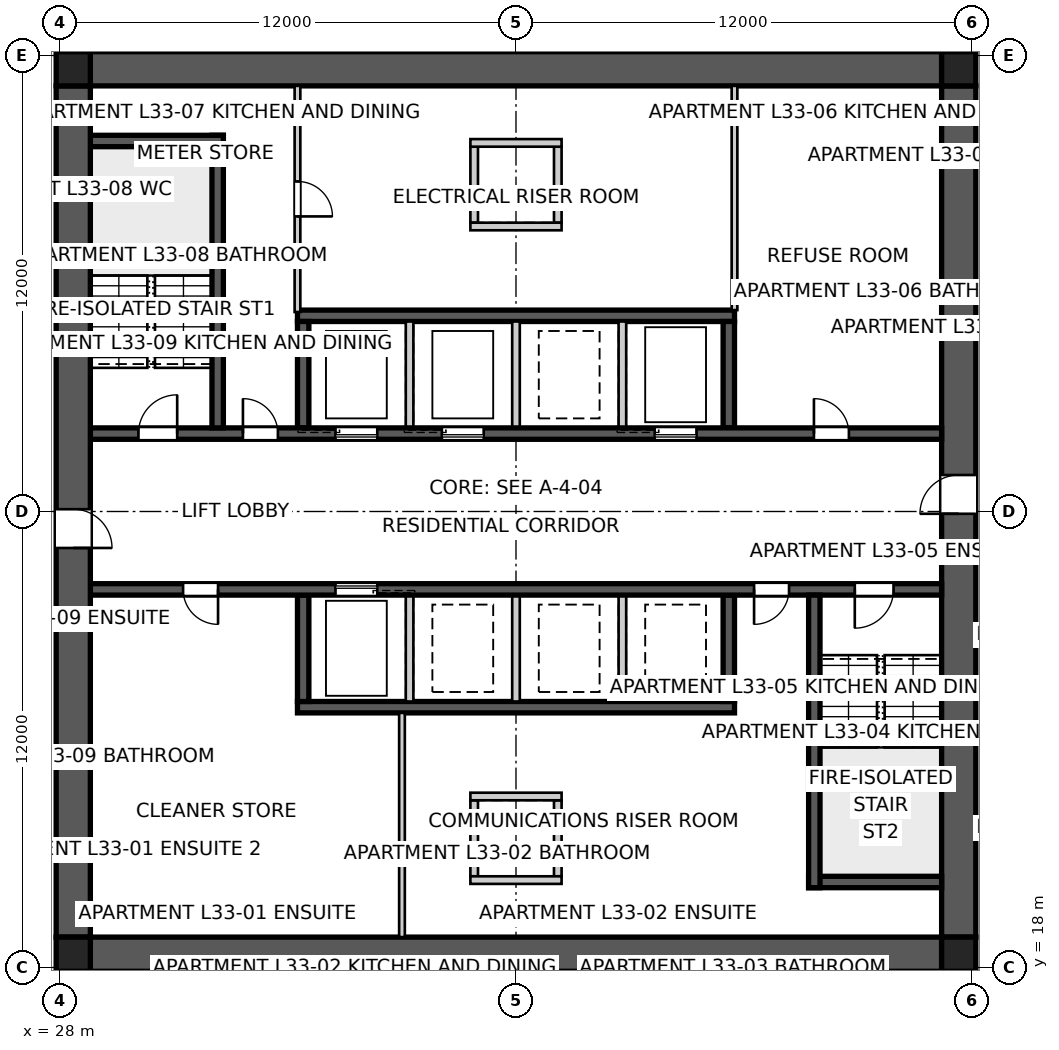
"""IFC4 building model, lengths in metres.
Left out: names, types, materials, properties, quantities, classifications, styles, units other than length and angle.
Written with IfcOpenShell. Run it as: python <this file> out.ifc"""

import sys

from ifc_helpers import new_model, si_unit, direction, frame, frame_2d, origin, origin_2d, place, context, subcontext, project, spatial, polyline, rectangle, outline, extrude, element, fill, save


model = new_model("IFC4")
c1 = context("Model", 3, precision=1e-05, world=origin(), true_north=direction((0.0, 1.0)))
c2 = subcontext(c1, "Body", "Model", "MODEL_VIEW")
j1 = project(units=[si_unit("LENGTHUNIT", "METRE"), si_unit("PLANEANGLEUNIT", "RADIAN")], contexts=[c1])
p1 = place(None, origin())
s1 = spatial("IfcSite", under=j1, at=p1, CompositionType="ELEMENT")
p2 = place(p1, origin())
s2 = spatial("IfcBuilding", under=s1, at=p2, CompositionType="ELEMENT")
p3 = place(p2, frame((0.0, 0.0, 121.8)))
s3 = spatial("IfcBuildingStorey", under=s2, at=p3, CompositionType="ELEMENT", Elevation=121.8)
for number, where, z_axis, x_axis in (
    (1, (28.8, 41.65, 0.0), (0.0, 0.0, 1.0), (1.0, 0.0, 0.0)),
    (2, (51.2, 18.35, 0.0), (0.0, 0.0, 1.0), (-1.0, 0.0, 0.0)),
):
    element("IfcWall", number, at=place(p3, frame(where, z_axis=z_axis, x_axis=x_axis)), inside=s3, PredefinedType="SHEAR", context=c2, shape_type="SweptSolid", body=[
        extrude(outline(polyline([(0.0, -0.45), (22.4, -0.45), (22.4, -0.025), (22.85, -0.025), (22.85, 0.025), (22.4, 0.025), (22.4, 0.45), (0.0, 0.45), (0.0, 0.025), (-0.45, 0.025), (-0.45, -0.025), (0.0, -0.025), (0.0, -0.45)])), origin(), (0.0, 0.0, 1.0), 3.4),
    ])
p4 = place(p3, frame((51.65, 18.8, 0.0), z_axis=(0.0, 0.0, 1.0), x_axis=(0.0, 1.0, 0.0)))
e3 = element("IfcWall", 3, at=p4, inside=s3, PredefinedType="SHEAR", context=c2, shape_type="SweptSolid", body=[
    extrude(outline(polyline([(0.0, -0.45), (22.4, -0.45), (22.4, -0.025), (22.85, -0.025), (22.85, 0.025), (22.4, 0.025), (22.4, 0.45), (0.0, 0.45), (0.0, 0.025), (-0.45, 0.025), (-0.45, -0.025), (0.0, -0.025), (0.0, -0.45)])), origin(), (0.0, 0.0, 1.0), 3.4),
])
p5 = place(p4, frame((11.14, 0.0, 0.0)))
e4 = element("IfcOpeningElement", 4, at=p5, cuts=e3, PredefinedType="OPENING", context=c2, shape_type="SweptSolid", body=[
    extrude(rectangle(XDim=1.02, YDim=2.4, at=frame_2d((0.51, 1.2))), frame((0.0, 0.46, 0.0), z_axis=(0.0, -1.0, 0.0), x_axis=(1.0, 0.0, 0.0)), (0.0, 0.0, 1.0), 0.92),
])
p6 = place(p3, frame((28.35, 41.2, 0.0), z_axis=(0.0, 0.0, 1.0), x_axis=(0.0, -1.0, 0.0)))
e5 = element("IfcWall", 5, at=p6, inside=s3, PredefinedType="SHEAR", context=c2, shape_type="SweptSolid", body=[
    extrude(outline(polyline([(0.0, -0.45), (22.4, -0.45), (22.4, -0.025), (22.85, -0.025), (22.85, 0.025), (22.4, 0.025), (22.4, 0.45), (0.0, 0.45), (0.0, 0.025), (-0.45, 0.025), (-0.45, -0.025), (0.0, -0.025), (0.0, -0.45)])), origin(), (0.0, 0.0, 1.0), 3.4),
])
p7 = place(p6, frame((11.14, 0.0, 0.0)))
e6 = element("IfcOpeningElement", 6, at=p7, cuts=e5, PredefinedType="OPENING", context=c2, shape_type="SweptSolid", body=[
    extrude(rectangle(XDim=1.02, YDim=2.4, at=frame_2d((0.51, 1.2))), frame((0.0, 0.46, 0.0), z_axis=(0.0, -1.0, 0.0), x_axis=(1.0, 0.0, 0.0)), (0.0, 0.0, 1.0), 0.92),
])
p8 = place(p3, frame((28.8, 32.05, 0.0), z_axis=(0.0, 0.0, 1.0), x_axis=(1.0, 0.0, 0.0)))
e7 = element("IfcWall", 7, at=p8, inside=s3, PredefinedType="SHEAR", context=c2, shape_type="SweptSolid", body=[
    extrude(rectangle(XDim=22.4, YDim=0.3, at=frame_2d((11.2, 0.0))), origin(), (0.0, 0.0, 1.0), 3.4),
])
p9 = place(p8, frame((19.04, 0.0, 0.0)))
e8 = element("IfcOpeningElement", 8, at=p9, cuts=e7, PredefinedType="OPENING", context=c2, shape_type="SweptSolid", body=[
    extrude(rectangle(XDim=0.92, YDim=2.1, at=frame_2d((0.46, 1.05))), frame((0.0, 0.16, 0.0), z_axis=(0.0, -1.0, 0.0), x_axis=(1.0, 0.0, 0.0)), (0.0, 0.0, 1.0), 0.32),
])
p10 = place(p8, frame((1.265, 0.0, 0.0)))
e9 = element("IfcOpeningElement", 9, at=p10, cuts=e7, PredefinedType="OPENING", context=c2, shape_type="SweptSolid", body=[
    extrude(rectangle(XDim=1.02, YDim=2.1, at=frame_2d((0.51, 1.05))), frame((0.0, 0.16, 0.0), z_axis=(0.0, -1.0, 0.0), x_axis=(1.0, 0.0, 0.0)), (0.0, 0.0, 1.0), 0.32),
])
p11 = place(p8, frame((4.015, 0.0, 0.0)))
e10 = element("IfcOpeningElement", 10, at=p11, cuts=e7, PredefinedType="OPENING", context=c2, shape_type="SweptSolid", body=[
    extrude(rectangle(XDim=0.92, YDim=2.1, at=frame_2d((0.46, 1.05))), frame((0.0, 0.16, 0.0), z_axis=(0.0, -1.0, 0.0), x_axis=(1.0, 0.0, 0.0)), (0.0, 0.0, 1.0), 0.32),
])
p12 = place(p8, frame((6.45, 0.0, 0.0)))
e11 = element("IfcOpeningElement", 11, at=p12, cuts=e7, PredefinedType="OPENING", context=c2, shape_type="SweptSolid", body=[
    extrude(rectangle(XDim=1.1, YDim=2.1, at=frame_2d((0.55, 1.05))), frame((0.0, 0.16, 0.0), z_axis=(0.0, -1.0, 0.0), x_axis=(1.0, 0.0, 0.0)), (0.0, 0.0, 1.0), 0.32),
])
p13 = place(p8, frame((9.25, 0.0, 0.0)))
e12 = element("IfcOpeningElement", 12, at=p13, cuts=e7, PredefinedType="OPENING", context=c2, shape_type="SweptSolid", body=[
    extrude(rectangle(XDim=1.1, YDim=2.1, at=frame_2d((0.55, 1.05))), frame((0.0, 0.16, 0.0), z_axis=(0.0, -1.0, 0.0), x_axis=(1.0, 0.0, 0.0)), (0.0, 0.0, 1.0), 0.32),
])
p14 = place(p8, frame((14.85, 0.0, 0.0)))
e13 = element("IfcOpeningElement", 13, at=p14, cuts=e7, PredefinedType="OPENING", context=c2, shape_type="SweptSolid", body=[
    extrude(rectangle(XDim=1.1, YDim=2.1, at=frame_2d((0.55, 1.05))), frame((0.0, 0.16, 0.0), z_axis=(0.0, -1.0, 0.0), x_axis=(1.0, 0.0, 0.0)), (0.0, 0.0, 1.0), 0.32),
])
p15 = place(p3, frame((51.2, 27.95, 0.0), z_axis=(0.0, 0.0, 1.0), x_axis=(-1.0, 0.0, 0.0)))
e14 = element("IfcWall", 14, at=p15, inside=s3, PredefinedType="SHEAR", context=c2, shape_type="SweptSolid", body=[
    extrude(rectangle(XDim=22.4, YDim=0.3, at=frame_2d((11.2, 0.0))), origin(), (0.0, 0.0, 1.0), 3.4),
])
p16 = place(p15, frame((19.04, 0.0, 0.0)))
e15 = element("IfcOpeningElement", 15, at=p16, cuts=e14, PredefinedType="OPENING", context=c2, shape_type="SweptSolid", body=[
    extrude(rectangle(XDim=0.92, YDim=2.1, at=frame_2d((0.46, 1.05))), frame((0.0, 0.16, 0.0), z_axis=(0.0, -1.0, 0.0), x_axis=(1.0, 0.0, 0.0)), (0.0, 0.0, 1.0), 0.32),
])
p17 = place(p15, frame((1.265, 0.0, 0.0)))
e16 = element("IfcOpeningElement", 16, at=p17, cuts=e14, PredefinedType="OPENING", context=c2, shape_type="SweptSolid", body=[
    extrude(rectangle(XDim=1.02, YDim=2.1, at=frame_2d((0.51, 1.05))), frame((0.0, 0.16, 0.0), z_axis=(0.0, -1.0, 0.0), x_axis=(1.0, 0.0, 0.0)), (0.0, 0.0, 1.0), 0.32),
])
p18 = place(p15, frame((4.015, 0.0, 0.0)))
e17 = element("IfcOpeningElement", 17, at=p18, cuts=e14, PredefinedType="OPENING", context=c2, shape_type="SweptSolid", body=[
    extrude(rectangle(XDim=0.92, YDim=2.1, at=frame_2d((0.46, 1.05))), frame((0.0, 0.16, 0.0), z_axis=(0.0, -1.0, 0.0), x_axis=(1.0, 0.0, 0.0)), (0.0, 0.0, 1.0), 0.32),
])
p19 = place(p15, frame((14.85, 0.0, 0.0)))
e18 = element("IfcOpeningElement", 18, at=p19, cuts=e14, PredefinedType="OPENING", context=c2, shape_type="SweptSolid", body=[
    extrude(rectangle(XDim=1.1, YDim=2.1, at=frame_2d((0.55, 1.05))), frame((0.0, 0.16, 0.0), z_axis=(0.0, -1.0, 0.0), x_axis=(1.0, 0.0, 0.0)), (0.0, 0.0, 1.0), 0.32),
])
for number, where, z_axis, x_axis in (
    (19, (34.25, 35.15, 0.0), (0.0, 0.0, 1.0), (1.0, 0.0, 0.0)),
    (20, (45.75, 24.85, 0.0), (0.0, 0.0, 1.0), (-1.0, 0.0, 0.0)),
):
    element("IfcWall", number, at=place(p3, frame(where, z_axis=z_axis, x_axis=x_axis)), inside=s3, PredefinedType="SHEAR", context=c2, shape_type="SweptSolid", body=[
        extrude(rectangle(XDim=11.5, YDim=0.3, at=frame_2d((5.75, 0.0))), origin(), (0.0, 0.0, 1.0), 3.4),
    ])
for number, where, z_axis, x_axis in (
    (21, (34.4, 32.2, 0.0), (0.0, 0.0, 1.0), (0.0, 1.0, 0.0)),
    (22, (45.6, 27.8, 0.0), (0.0, 0.0, 1.0), (0.0, -1.0, 0.0)),
):
    element("IfcWall", number, at=place(p3, frame(where, z_axis=z_axis, x_axis=x_axis)), inside=s3, PredefinedType="SHEAR", context=c2, shape_type="SweptSolid", body=[
        extrude(rectangle(XDim=2.8, YDim=0.3, at=frame_2d((1.4, 0.0))), origin(), (0.0, 0.0, 1.0), 3.4),
    ])
for number, where, z_axis, x_axis in (
    (23, (37.2, 32.2, 0.0), (0.0, 0.0, 1.0), (0.0, 1.0, 0.0)),
    (24, (42.8, 27.8, 0.0), (0.0, 0.0, 1.0), (0.0, -1.0, 0.0)),
    (25, (40.0, 32.2, 0.0), (0.0, 0.0, 1.0), (0.0, 1.0, 0.0)),
    (26, (40.0, 27.8, 0.0), (0.0, 0.0, 1.0), (0.0, -1.0, 0.0)),
    (27, (42.8, 32.2, 0.0), (0.0, 0.0, 1.0), (0.0, 1.0, 0.0)),
    (28, (37.2, 27.8, 0.0), (0.0, 0.0, 1.0), (0.0, -1.0, 0.0)),
):
    element("IfcWall", number, at=place(p3, frame(where, z_axis=z_axis, x_axis=x_axis)), inside=s3, PredefinedType="SOLIDWALL", context=c2, shape_type="SweptSolid", body=[
        extrude(rectangle(XDim=2.8, YDim=0.2, at=frame_2d((1.4, 0.0))), origin(), (0.0, 0.0, 1.0), 3.4),
    ])
for number, where, z_axis, x_axis in (
    (29, (45.6, 32.2, 0.0), (0.0, 0.0, 1.0), (0.0, 1.0, 0.0)),
    (30, (34.4, 27.8, 0.0), (0.0, 0.0, 1.0), (0.0, -1.0, 0.0)),
):
    element("IfcWall", number, at=place(p3, frame(where, z_axis=z_axis, x_axis=x_axis)), inside=s3, PredefinedType="SHEAR", context=c2, shape_type="SweptSolid", body=[
        extrude(rectangle(XDim=2.8, YDim=0.3, at=frame_2d((1.4, 0.0))), origin(), (0.0, 0.0, 1.0), 3.4),
    ])
p20 = place(p3, frame((32.15, 32.2, 0.0), z_axis=(0.0, 0.0, 1.0), x_axis=(0.0, 1.0, 0.0)))
e31 = element("IfcWall", 31, at=p20, inside=s3, PredefinedType="SHEAR", context=c2, shape_type="SweptSolid", body=[
    extrude(rectangle(XDim=7.7, YDim=0.3, at=frame_2d((3.85, 0.0))), origin(), (0.0, 0.0, 1.0), 3.4),
])
p21 = place(p3, frame((28.8, 39.75, 0.0), z_axis=(0.0, 0.0, 1.0), x_axis=(1.0, 0.0, 0.0)))
e32 = element("IfcWall", 32, at=p21, inside=s3, PredefinedType="SHEAR", context=c2, shape_type="SweptSolid", body=[
    extrude(rectangle(XDim=3.5, YDim=0.3, at=frame_2d((1.75, 0.0))), origin(), (0.0, 0.0, 1.0), 3.4),
])
p22 = place(p3, frame((47.85, 27.8, 0.0), z_axis=(0.0, 0.0, 1.0), x_axis=(0.0, -1.0, 0.0)))
e33 = element("IfcWall", 33, at=p22, inside=s3, PredefinedType="SHEAR", context=c2, shape_type="SweptSolid", body=[
    extrude(rectangle(XDim=7.7, YDim=0.3, at=frame_2d((3.85, 0.0))), origin(), (0.0, 0.0, 1.0), 3.4),
])
p23 = place(p3, frame((51.2, 20.25, 0.0), z_axis=(0.0, 0.0, 1.0), x_axis=(-1.0, 0.0, 0.0)))
e34 = element("IfcWall", 34, at=p23, inside=s3, PredefinedType="SHEAR", context=c2, shape_type="SweptSolid", body=[
    extrude(rectangle(XDim=3.5, YDim=0.3, at=frame_2d((1.75, 0.0))), origin(), (0.0, 0.0, 1.0), 3.4),
])
for number, where, z_axis, x_axis in (
    (35, (38.9, 37.6, 0.0), (0.0, 0.0, 1.0), (0.0, 1.0, 0.0)),
    (36, (41.1, 37.6, 0.0), (0.0, 0.0, 1.0), (0.0, 1.0, 0.0)),
):
    element("IfcWall", number, at=place(p3, frame(where, z_axis=z_axis, x_axis=x_axis)), inside=s3, PredefinedType="SOLIDWALL", context=c2, shape_type="SweptSolid", body=[
        extrude(rectangle(XDim=2.0, YDim=0.2, at=frame_2d((1.0, 0.0))), origin(), (0.0, 0.0, 1.0), 3.4),
    ])
for number, where, z_axis, x_axis in (
    (37, (38.8, 37.5, 0.0), (0.0, 0.0, 1.0), (1.0, 0.0, 0.0)),
    (38, (38.8, 39.7, 0.0), (0.0, 0.0, 1.0), (1.0, 0.0, 0.0)),
):
    element("IfcWall", number, at=place(p3, frame(where, z_axis=z_axis, x_axis=x_axis)), inside=s3, PredefinedType="SOLIDWALL", context=c2, shape_type="SweptSolid", body=[
        extrude(rectangle(XDim=2.4, YDim=0.2, at=frame_2d((1.2, 0.0))), origin(), (0.0, 0.0, 1.0), 3.4),
    ])
for number, where, z_axis, x_axis in (
    (39, (38.9, 22.4, 0.0), (0.0, 0.0, 1.0), (0.0, -1.0, 0.0)),
    (40, (41.1, 22.4, 0.0), (0.0, 0.0, 1.0), (0.0, -1.0, 0.0)),
):
    element("IfcWall", number, at=place(p3, frame(where, z_axis=z_axis, x_axis=x_axis)), inside=s3, PredefinedType="SOLIDWALL", context=c2, shape_type="SweptSolid", body=[
        extrude(rectangle(XDim=2.0, YDim=0.2, at=frame_2d((1.0, 0.0))), origin(), (0.0, 0.0, 1.0), 3.4),
    ])
for number, where, z_axis, x_axis in (
    (41, (38.8, 22.5, 0.0), (0.0, 0.0, 1.0), (1.0, 0.0, 0.0)),
    (42, (38.8, 20.3, 0.0), (0.0, 0.0, 1.0), (1.0, 0.0, 0.0)),
):
    element("IfcWall", number, at=place(p3, frame(where, z_axis=z_axis, x_axis=x_axis)), inside=s3, PredefinedType="SOLIDWALL", context=c2, shape_type="SweptSolid", body=[
        extrude(rectangle(XDim=2.4, YDim=0.2, at=frame_2d((1.2, 0.0))), origin(), (0.0, 0.0, 1.0), 3.4),
    ])
for number, where, z_axis, x_axis in (
    (43, (28.35, 18.35, 0.0), (0.0, 0.0, 1.0), (1.0, 0.0, 0.0)),
    (44, (51.65, 18.35, 0.0), (0.0, 0.0, 1.0), (1.0, 0.0, 0.0)),
    (45, (51.65, 41.65, 0.0), (0.0, 0.0, 1.0), (1.0, 0.0, 0.0)),
    (46, (28.35, 41.65, 0.0), (0.0, 0.0, 1.0), (1.0, 0.0, 0.0)),
):
    element("IfcColumn", number, at=place(p3, frame(where, z_axis=z_axis, x_axis=x_axis)), inside=s3, PredefinedType="COLUMN", context=c2, shape_type="SweptSolid", body=[
        extrude(rectangle(XDim=0.9, YDim=0.9, at=origin_2d()), origin(), (0.0, 0.0, 1.0), 3.4),
    ])
p24 = place(p3, frame((34.25, 41.2, 0.0), z_axis=(0.0, 0.0, 1.0), x_axis=(0.0, -1.0, 0.0)))
e47 = element("IfcWall", 47, at=p24, inside=s3, PredefinedType="SOLIDWALL", context=c2, shape_type="SweptSolid", body=[
    extrude(rectangle(XDim=5.95, YDim=0.15, at=frame_2d((2.975, 0.0))), origin(), (0.0, 0.0, 1.0), 3.25),
])
p25 = place(p24, frame((2.515, 0.0, 0.0)))
e48 = element("IfcOpeningElement", 48, at=p25, cuts=e47, PredefinedType="OPENING", context=c2, shape_type="SweptSolid", body=[
    extrude(rectangle(XDim=0.92, YDim=2.1, at=frame_2d((0.46, 1.05))), frame((0.0, 0.085, 0.0), z_axis=(0.0, -1.0, 0.0), x_axis=(1.0, 0.0, 0.0)), (0.0, 0.0, 1.0), 0.17),
])
for number, where, z_axis, x_axis in (
    (49, (45.75, 41.2, 0.0), (0.0, 0.0, 1.0), (0.0, -1.0, 0.0)),
    (50, (37.0, 18.8, 0.0), (0.0, 0.0, 1.0), (0.0, 1.0, 0.0)),
):
    element("IfcWall", number, at=place(p3, frame(where, z_axis=z_axis, x_axis=x_axis)), inside=s3, PredefinedType="SOLIDWALL", context=c2, shape_type="SweptSolid", body=[
        extrude(rectangle(XDim=5.9, YDim=0.15, at=frame_2d((2.95, 0.0))), origin(), (0.0, 0.0, 1.0), 3.25),
    ])
p26 = place(p9, origin())
e51 = element("IfcDoor", 51, at=p26, inside=s3, OperationType="SINGLE_SWING_LEFT", PredefinedType="DOOR", context=c2, shape_type="SweptSolid", body=[
    extrude(rectangle(XDim=0.92, YDim=2.1, at=frame_2d((0.46, 1.05))), frame((0.0, 0.025, 0.0), z_axis=(0.0, -1.0, 0.0), x_axis=(1.0, 0.0, 0.0)), (0.0, 0.0, 1.0), 0.05),
])
fill(e8, e51)
p27 = place(p16, origin())
e52 = element("IfcDoor", 52, at=p27, inside=s3, OperationType="SINGLE_SWING_LEFT", PredefinedType="DOOR", context=c2, shape_type="SweptSolid", body=[
    extrude(rectangle(XDim=0.92, YDim=2.1, at=frame_2d((0.46, 1.05))), frame((0.0, 0.025, 0.0), z_axis=(0.0, -1.0, 0.0), x_axis=(1.0, 0.0, 0.0)), (0.0, 0.0, 1.0), 0.05),
])
fill(e15, e52)
p28 = place(p17, origin())
e53 = element("IfcDoor", 53, at=p28, inside=s3, OperationType="SINGLE_SWING_RIGHT", PredefinedType="DOOR", context=c2, shape_type="SweptSolid", body=[
    extrude(rectangle(XDim=1.02, YDim=2.1, at=frame_2d((0.51, 1.05))), frame((0.0, 0.025, 0.0), z_axis=(0.0, -1.0, 0.0), x_axis=(1.0, 0.0, 0.0)), (0.0, 0.0, 1.0), 0.05),
])
fill(e16, e53)
p29 = place(p10, origin())
e54 = element("IfcDoor", 54, at=p29, inside=s3, OperationType="SINGLE_SWING_RIGHT", PredefinedType="DOOR", context=c2, shape_type="SweptSolid", body=[
    extrude(rectangle(XDim=1.02, YDim=2.1, at=frame_2d((0.51, 1.05))), frame((0.0, 0.025, 0.0), z_axis=(0.0, -1.0, 0.0), x_axis=(1.0, 0.0, 0.0)), (0.0, 0.0, 1.0), 0.05),
])
fill(e9, e54)
p30 = place(p11, origin())
e55 = element("IfcDoor", 55, at=p30, inside=s3, OperationType="SINGLE_SWING_LEFT", PredefinedType="DOOR", context=c2, shape_type="SweptSolid", body=[
    extrude(rectangle(XDim=0.92, YDim=2.1, at=frame_2d((0.46, 1.05))), frame((0.0, 0.025, 0.0), z_axis=(0.0, -1.0, 0.0), x_axis=(1.0, 0.0, 0.0)), (0.0, 0.0, 1.0), 0.05),
])
fill(e10, e55)
p31 = place(p18, origin())
e56 = element("IfcDoor", 56, at=p31, inside=s3, OperationType="SINGLE_SWING_RIGHT", PredefinedType="DOOR", context=c2, shape_type="SweptSolid", body=[
    extrude(rectangle(XDim=0.92, YDim=2.1, at=frame_2d((0.46, 1.05))), frame((0.0, 0.025, 0.0), z_axis=(0.0, -1.0, 0.0), x_axis=(1.0, 0.0, 0.0)), (0.0, 0.0, 1.0), 0.05),
])
fill(e17, e56)
p32 = place(p25, origin())
e57 = element("IfcDoor", 57, at=p32, inside=s3, OperationType="SINGLE_SWING_RIGHT", PredefinedType="DOOR", context=c2, shape_type="SweptSolid", body=[
    extrude(rectangle(XDim=0.92, YDim=2.1, at=frame_2d((0.46, 1.05))), frame((0.0, 0.025, 0.0), z_axis=(0.0, -1.0, 0.0), x_axis=(1.0, 0.0, 0.0)), (0.0, 0.0, 1.0), 0.05),
])
fill(e48, e57)
p33 = place(p5, origin())
e58 = element("IfcDoor", 58, at=p33, inside=s3, OperationType="SINGLE_SWING_LEFT", PredefinedType="DOOR", context=c2, shape_type="SweptSolid", body=[
    extrude(rectangle(XDim=1.02, YDim=2.4, at=frame_2d((0.51, 1.2))), frame((0.0, 0.025, 0.0), z_axis=(0.0, -1.0, 0.0), x_axis=(1.0, 0.0, 0.0)), (0.0, 0.0, 1.0), 0.05),
])
fill(e4, e58)
p34 = place(p7, origin())
e59 = element("IfcDoor", 59, at=p34, inside=s3, OperationType="SINGLE_SWING_RIGHT", PredefinedType="DOOR", context=c2, shape_type="SweptSolid", body=[
    extrude(rectangle(XDim=1.02, YDim=2.4, at=frame_2d((0.51, 1.2))), frame((0.0, 0.025, 0.0), z_axis=(0.0, -1.0, 0.0), x_axis=(1.0, 0.0, 0.0)), (0.0, 0.0, 1.0), 0.05),
])
fill(e6, e59)
p35 = place(p12, origin())
e60 = element("IfcDoor", 60, at=p35, inside=s3, OperationType="SLIDING_TO_LEFT", PredefinedType="DOOR", context=c2, shape_type="SweptSolid", body=[
    extrude(rectangle(XDim=1.1, YDim=2.1, at=frame_2d((0.55, 1.05))), frame((0.0, 0.025, 0.0), z_axis=(0.0, -1.0, 0.0), x_axis=(1.0, 0.0, 0.0)), (0.0, 0.0, 1.0), 0.05),
])
fill(e11, e60)
p36 = place(p13, origin())
e61 = element("IfcDoor", 61, at=p36, inside=s3, OperationType="SLIDING_TO_LEFT", PredefinedType="DOOR", context=c2, shape_type="SweptSolid", body=[
    extrude(rectangle(XDim=1.1, YDim=2.1, at=frame_2d((0.55, 1.05))), frame((0.0, 0.025, 0.0), z_axis=(0.0, -1.0, 0.0), x_axis=(1.0, 0.0, 0.0)), (0.0, 0.0, 1.0), 0.05),
])
fill(e12, e61)
p37 = place(p14, origin())
e62 = element("IfcDoor", 62, at=p37, inside=s3, OperationType="SLIDING_TO_LEFT", PredefinedType="DOOR", context=c2, shape_type="SweptSolid", body=[
    extrude(rectangle(XDim=1.1, YDim=2.1, at=frame_2d((0.55, 1.05))), frame((0.0, 0.025, 0.0), z_axis=(0.0, -1.0, 0.0), x_axis=(1.0, 0.0, 0.0)), (0.0, 0.0, 1.0), 0.05),
])
fill(e13, e62)
p38 = place(p19, origin())
e63 = element("IfcDoor", 63, at=p38, inside=s3, OperationType="SLIDING_TO_LEFT", PredefinedType="DOOR", context=c2, shape_type="SweptSolid", body=[
    extrude(rectangle(XDim=1.1, YDim=2.1, at=frame_2d((0.55, 1.05))), frame((0.0, 0.025, 0.0), z_axis=(0.0, -1.0, 0.0), x_axis=(1.0, 0.0, 0.0)), (0.0, 0.0, 1.0), 0.05),
])
fill(e18, e63)
save(model, sys.argv[1])
